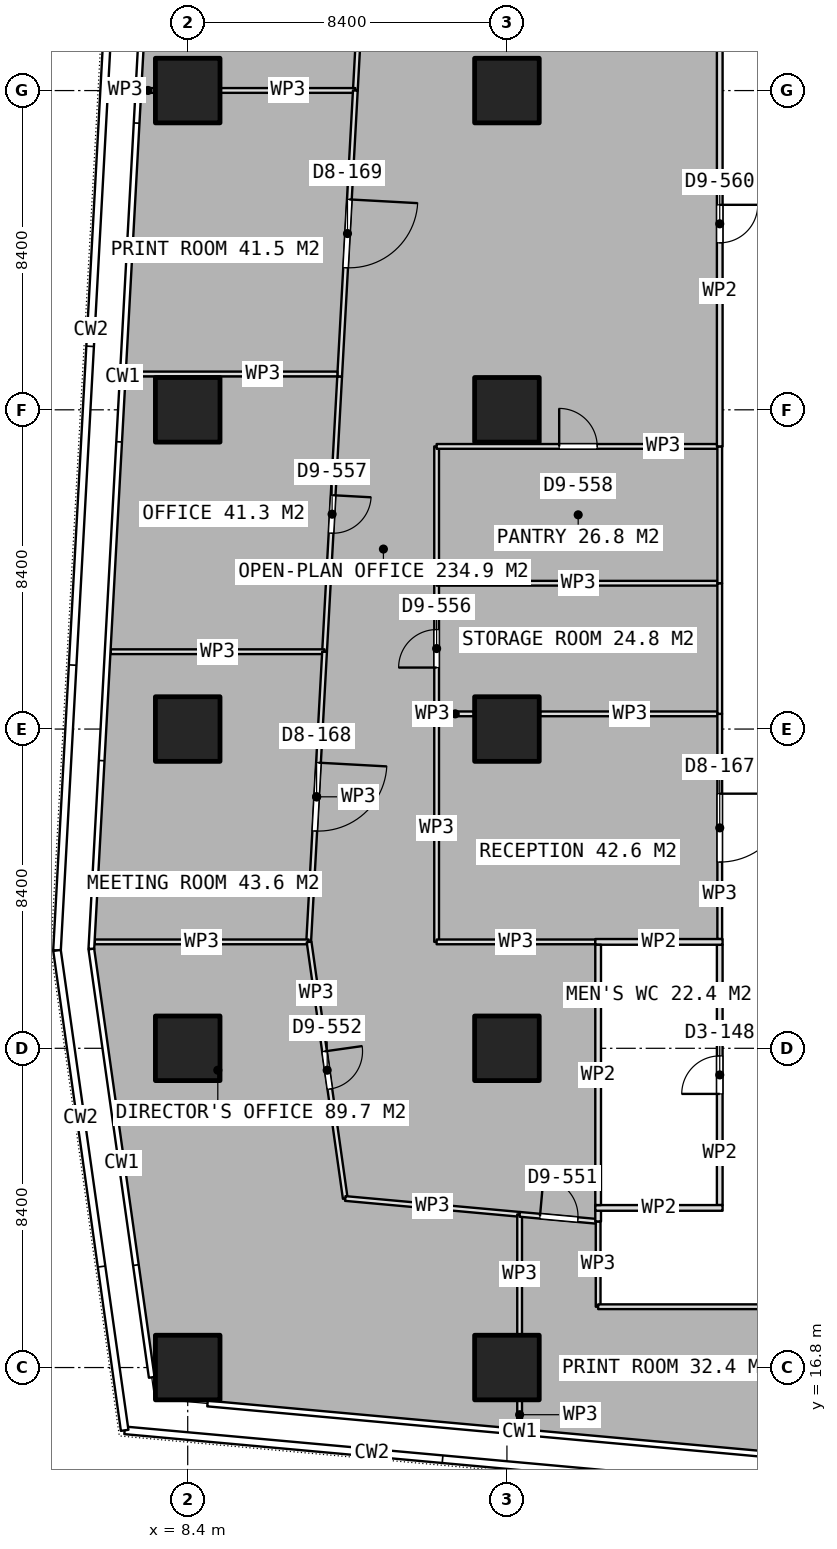
"""IFC4 building model, lengths in metres.
Left out: names, types, materials, properties, quantities, classifications, styles, units other than length and angle.
Written with IfcOpenShell. Run it as: python <this file> out.ifc"""

import sys

from ifc_helpers import new_model, si_unit, direction, frame, frame_2d, origin, origin_2d, place, context, subcontext, project, spatial, rectangle, extrude, element, fill, save


model = new_model("IFC4")
c1 = context("Model", 3, precision=1e-05, world=origin(), true_north=direction((0.0, 1.0)))
c2 = subcontext(c1, "Body", "Model", "MODEL_VIEW")
j1 = project(units=[si_unit("LENGTHUNIT", "METRE"), si_unit("PLANEANGLEUNIT", "RADIAN")], contexts=[c1])
p1 = place(None, origin())
s1 = spatial("IfcSite", under=j1, at=p1, CompositionType="ELEMENT")
p2 = place(p1, origin())
s2 = spatial("IfcBuilding", under=s1, at=p2, CompositionType="ELEMENT")
p3 = place(p2, frame((0.0, 0.0, 140.3)))
s3 = spatial("IfcBuildingStorey", under=s2, at=p3, CompositionType="ELEMENT", Elevation=140.3)
for number, where, z_axis, x_axis in (
    (1, (8.4, 16.8, 0.0), (0.0, 0.0, 1.0), (1.0, 0.0, 0.0)),
    (2, (8.4, 25.2, 0.0), (0.0, 0.0, 1.0), (1.0, 0.0, 0.0)),
    (3, (8.4, 33.6, 0.0), (0.0, 0.0, 1.0), (1.0, 0.0, 0.0)),
    (4, (8.4, 42.0, 0.0), (0.0, 0.0, 1.0), (1.0, 0.0, 0.0)),
    (5, (8.4, 50.4, 0.0), (0.0, 0.0, 1.0), (1.0, 0.0, 0.0)),
    (6, (16.8, 16.8, 0.0), (0.0, 0.0, 1.0), (1.0, 0.0, 0.0)),
    (7, (16.8, 25.2, 0.0), (0.0, 0.0, 1.0), (1.0, 0.0, 0.0)),
    (8, (16.8, 33.6, 0.0), (0.0, 0.0, 1.0), (1.0, 0.0, 0.0)),
    (9, (16.8, 42.0, 0.0), (0.0, 0.0, 1.0), (1.0, 0.0, 0.0)),
    (10, (16.8, 50.4, 0.0), (0.0, 0.0, 1.0), (1.0, 0.0, 0.0)),
):
    element("IfcColumn", number, at=place(p3, frame(where, z_axis=z_axis, x_axis=x_axis)), inside=s3, PredefinedType="COLUMN", context=c2, shape_type="SweptSolid", body=[
        extrude(rectangle(XDim=1.7, YDim=1.7, at=origin_2d()), origin(), (0.0, 0.0, 1.0), 3.75),
    ])
for number, where, z_axis, x_axis in (
    (11, (19.125, 21.0, 0.0), (0.0, 0.0, 1.0), (1.0, 0.0, 0.0)),
    (12, (19.125, 28.0, 0.0), (0.0, 0.0, 1.0), (1.0, 0.0, 0.0)),
):
    element("IfcWall", number, at=place(p3, frame(where, z_axis=z_axis, x_axis=x_axis)), inside=s3, PredefinedType="PARTITIONING", context=c2, shape_type="SweptSolid", body=[
        extrude(rectangle(XDim=3.35, YDim=0.15, at=frame_2d((1.675, 0.0))), origin(), (0.0, 0.0, 1.0), 3.5),
    ])
p4 = place(p3, frame((19.2, 21.075, 0.0), z_axis=(0.0, 0.0, 1.0), x_axis=(0.0, 1.0, 0.0)))
e13 = element("IfcWall", 13, at=p4, inside=s3, PredefinedType="PARTITIONING", context=c2, shape_type="SweptSolid", body=[
    extrude(rectangle(XDim=6.85, YDim=0.15, at=frame_2d((3.425, 0.0))), origin(), (0.0, 0.0, 1.0), 3.5),
])
p5 = place(p3, frame((22.4, 21.075, 0.0), z_axis=(0.0, 0.0, 1.0), x_axis=(0.0, 1.0, 0.0)))
e14 = element("IfcWall", 14, at=p5, inside=s3, PredefinedType="PARTITIONING", context=c2, shape_type="SweptSolid", body=[
    extrude(rectangle(XDim=6.85, YDim=0.15, at=frame_2d((3.425, 0.0))), origin(), (0.0, 0.0, 1.0), 3.5),
])
p6 = place(p5, frame((2.925, 0.0, 0.0)))
e15 = element("IfcOpeningElement", 15, at=p6, cuts=e14, PredefinedType="OPENING", context=c2, shape_type="SweptSolid", body=[
    extrude(rectangle(XDim=1.0, YDim=2.1, at=frame_2d((0.5, 1.05))), frame((0.0, 0.085, 0.0), z_axis=(0.0, -1.0, 0.0), x_axis=(1.0, 0.0, 0.0)), (0.0, 0.0, 1.0), 0.17),
])
p7 = place(p3, frame((13.061, 54.954, 0.0), z_axis=(0.0, 0.0, 1.0), x_axis=(-0.054849980007, -0.998494606742, 0.0)))
e16 = element("IfcWall", 16, at=p7, inside=s3, PredefinedType="PARTITIONING", context=c2, shape_type="SweptSolid", body=[
    extrude(rectangle(XDim=4.558, YDim=0.125, at=frame_2d((2.279, 0.0))), origin(), (0.0, 0.0, 1.0), 3.5),
])
p8 = place(p7, frame((1.779, 0.0, 0.0)))
e17 = element("IfcOpeningElement", 17, at=p8, cuts=e16, PredefinedType="OPENING", context=c2, shape_type="SweptSolid", body=[
    extrude(rectangle(XDim=1.0, YDim=2.1, at=frame_2d((0.5, 1.05))), frame((0.0, 0.073, 0.0), z_axis=(0.0, -1.0, 0.0), x_axis=(1.0, 0.0, 0.0)), (0.0, 0.0, 1.0), 0.145),
])
p9 = place(p3, frame((12.811, 50.403, 0.0), z_axis=(0.0, 0.0, 1.0), x_axis=(-1.0, 0.0, 0.0)))
e18 = element("IfcWall", 18, at=p9, inside=s3, PredefinedType="PARTITIONING", context=c2, shape_type="SweptSolid", body=[
    extrude(rectangle(XDim=3.541, YDim=0.125, at=frame_2d((1.771, 0.0))), origin(), (0.0, 0.0, 1.0), 3.5),
])
p10 = place(p3, frame((7.53, 50.403, 0.0), z_axis=(0.0, 0.0, 1.0), x_axis=(-1.0, 0.0, 0.0)))
e19 = element("IfcWall", 19, at=p10, inside=s3, PredefinedType="PARTITIONING", context=c2, shape_type="SweptSolid", body=[
    extrude(rectangle(XDim=0.347, YDim=0.125, at=frame_2d((0.173, 0.0))), origin(), (0.0, 0.0, 1.0), 3.5),
])
p11 = place(p3, frame((12.811, 50.402, 0.0), z_axis=(0.0, 0.0, 1.0), x_axis=(-0.054783199126, -0.998498272955, 0.0)))
e20 = element("IfcWall", 20, at=p11, inside=s3, PredefinedType="PARTITIONING", context=c2, shape_type="SweptSolid", body=[
    extrude(rectangle(XDim=7.54, YDim=0.125, at=frame_2d((3.77, 0.0))), origin(), (0.0, 0.0, 1.0), 3.5),
])
p12 = place(p11, frame((2.87, 0.0, 0.0)))
e21 = element("IfcOpeningElement", 21, at=p12, cuts=e20, PredefinedType="OPENING", context=c2, shape_type="SweptSolid", body=[
    extrude(rectangle(XDim=1.8, YDim=2.1, at=frame_2d((0.9, 1.05))), frame((0.0, 0.073, 0.0), z_axis=(0.0, -1.0, 0.0), x_axis=(1.0, 0.0, 0.0)), (0.0, 0.0, 1.0), 0.145),
])
p13 = place(p3, frame((12.339, 42.943, 0.0), z_axis=(0.0, 0.0, 1.0), x_axis=(-1.0, 0.0, 0.0)))
e22 = element("IfcWall", 22, at=p13, inside=s3, PredefinedType="PARTITIONING", context=c2, shape_type="SweptSolid", body=[
    extrude(rectangle(XDim=5.595, YDim=0.125, at=frame_2d((2.798, 0.0))), origin(), (0.0, 0.0, 1.0), 3.5),
])
p14 = place(p3, frame((12.398, 42.872, 0.0), z_axis=(0.0, 0.0, 1.0), x_axis=(-0.054770412321, -0.998498974428, 0.0)))
e23 = element("IfcWall", 23, at=p14, inside=s3, PredefinedType="PARTITIONING", context=c2, shape_type="SweptSolid", body=[
    extrude(rectangle(XDim=7.248, YDim=0.125, at=frame_2d((3.624, 0.0))), origin(), (0.0, 0.0, 1.0), 3.5),
])
p15 = place(p14, frame((3.124, 0.0, 0.0)))
e24 = element("IfcOpeningElement", 24, at=p15, cuts=e23, PredefinedType="OPENING", context=c2, shape_type="SweptSolid", body=[
    extrude(rectangle(XDim=1.0, YDim=2.1, at=frame_2d((0.5, 1.05))), frame((0.0, 0.073, 0.0), z_axis=(0.0, -1.0, 0.0), x_axis=(1.0, 0.0, 0.0)), (0.0, 0.0, 1.0), 0.145),
])
p16 = place(p3, frame((12.001, 35.635, 0.0), z_axis=(0.0, 0.0, 1.0), x_axis=(-1.0, 0.0, 0.0)))
e25 = element("IfcWall", 25, at=p16, inside=s3, PredefinedType="PARTITIONING", context=c2, shape_type="SweptSolid", body=[
    extrude(rectangle(XDim=5.628, YDim=0.125, at=frame_2d((2.814, 0.0))), origin(), (0.0, 0.0, 1.0), 3.5),
])
p17 = place(p3, frame((12.001, 35.634, 0.0), z_axis=(0.0, 0.0, 1.0), x_axis=(-0.054668834128, -0.998504541089, 0.0)))
e26 = element("IfcWall", 26, at=p17, inside=s3, PredefinedType="PARTITIONING", context=c2, shape_type="SweptSolid", body=[
    extrude(rectangle(XDim=7.646, YDim=0.125, at=frame_2d((3.823, 0.0))), origin(), (0.0, 0.0, 1.0), 3.5),
])
p18 = place(p17, frame((2.923, 0.0, 0.0)))
e27 = element("IfcOpeningElement", 27, at=p18, cuts=e26, PredefinedType="OPENING", context=c2, shape_type="SweptSolid", body=[
    extrude(rectangle(XDim=1.8, YDim=2.1, at=frame_2d((0.9, 1.05))), frame((0.0, 0.073, 0.0), z_axis=(0.0, -1.0, 0.0), x_axis=(1.0, 0.0, 0.0)), (0.0, 0.0, 1.0), 0.145),
])
p19 = place(p3, frame((11.583, 28.0, 0.0), z_axis=(0.0, 0.0, 1.0), x_axis=(-1.0, 0.0, 0.0)))
e28 = element("IfcWall", 28, at=p19, inside=s3, PredefinedType="PARTITIONING", context=c2, shape_type="SweptSolid", body=[
    extrude(rectangle(XDim=5.629, YDim=0.125, at=frame_2d((2.814, 0.0))), origin(), (0.0, 0.0, 1.0), 3.5),
])
p20 = place(p3, frame((11.594, 27.999, 0.0), z_axis=(0.0, 0.0, 1.0), x_axis=(0.139621335816, -0.990204969986, 0.0)))
e29 = element("IfcWall", 29, at=p20, inside=s3, PredefinedType="PARTITIONING", context=c2, shape_type="SweptSolid", body=[
    extrude(rectangle(XDim=6.818, YDim=0.125, at=frame_2d((3.409, 0.0))), origin(), (0.0, 0.0, 1.0), 3.5),
])
p21 = place(p20, frame((2.909, 0.0, 0.0)))
e30 = element("IfcOpeningElement", 30, at=p21, cuts=e29, PredefinedType="OPENING", context=c2, shape_type="SweptSolid", body=[
    extrude(rectangle(XDim=1.0, YDim=2.1, at=frame_2d((0.5, 1.05))), frame((0.0, 0.073, 0.0), z_axis=(0.0, -1.0, 0.0), x_axis=(1.0, 0.0, 0.0)), (0.0, 0.0, 1.0), 0.145),
])
p22 = place(p3, frame((12.546, 21.248, 0.0), z_axis=(0.0, 0.0, 1.0), x_axis=(0.995895378021, -0.090511855779, 0.0)))
e31 = element("IfcWall", 31, at=p22, inside=s3, PredefinedType="PARTITIONING", context=c2, shape_type="SweptSolid", body=[
    extrude(rectangle(XDim=4.607, YDim=0.125, at=frame_2d((2.303, 0.0))), origin(), (0.0, 0.0, 1.0), 3.5),
])
p23 = place(p3, frame((17.134, 20.831, 0.0), z_axis=(0.0, 0.0, 1.0), x_axis=(0.0, -1.0, 0.0)))
e32 = element("IfcWall", 32, at=p23, inside=s3, PredefinedType="PARTITIONING", context=c2, shape_type="SweptSolid", body=[
    extrude(rectangle(XDim=3.161, YDim=0.125, at=frame_2d((1.581, 0.0))), origin(), (0.0, 0.0, 1.0), 3.5),
])
p24 = place(p3, frame((17.134, 15.93, 0.0), z_axis=(0.0, 0.0, 1.0), x_axis=(0.0, -1.0, 0.0)))
e33 = element("IfcWall", 33, at=p24, inside=s3, PredefinedType="PARTITIONING", context=c2, shape_type="SweptSolid", body=[
    extrude(rectangle(XDim=0.742, YDim=0.125, at=frame_2d((0.371, 0.0))), origin(), (0.0, 0.0, 1.0), 3.5),
])
p25 = place(p3, frame((17.135, 20.831, 0.0), z_axis=(0.0, 0.0, 1.0), x_axis=(0.995924033596, -0.090196004934, 0.0)))
e34 = element("IfcWall", 34, at=p25, inside=s3, PredefinedType="PARTITIONING", context=c2, shape_type="SweptSolid", body=[
    extrude(rectangle(XDim=2.073, YDim=0.125, at=frame_2d((1.037, 0.0))), origin(), (0.0, 0.0, 1.0), 3.5),
])
p26 = place(p25, frame((0.537, 0.0, 0.0)))
e35 = element("IfcOpeningElement", 35, at=p26, cuts=e34, PredefinedType="OPENING", context=c2, shape_type="SweptSolid", body=[
    extrude(rectangle(XDim=1.0, YDim=2.1, at=frame_2d((0.5, 1.05))), frame((0.0, 0.073, 0.0), z_axis=(0.0, -1.0, 0.0), x_axis=(1.0, 0.0, 0.0)), (0.0, 0.0, 1.0), 0.145),
])
p27 = place(p3, frame((19.2, 20.644, 0.0), z_axis=(0.0, 0.0, 1.0), x_axis=(0.0, -1.0, 0.0)))
e36 = element("IfcWall", 36, at=p27, inside=s3, PredefinedType="PARTITIONING", context=c2, shape_type="SweptSolid", body=[
    extrude(rectangle(XDim=2.244, YDim=0.125, at=frame_2d((1.122, 0.0))), origin(), (0.0, 0.0, 1.0), 3.5),
])
p28 = place(p3, frame((19.2, 18.4, 0.0), z_axis=(0.0, 0.0, 1.0), x_axis=(1.0, 0.0, 0.0)))
e37 = element("IfcWall", 37, at=p28, inside=s3, PredefinedType="PARTITIONING", context=c2, shape_type="SweptSolid", body=[
    extrude(rectangle(XDim=6.179, YDim=0.125, at=frame_2d((3.089, 0.0))), origin(), (0.0, 0.0, 1.0), 3.5),
])
p29 = place(p3, frame((14.95, 28.0, 0.0), z_axis=(0.0, 0.0, 1.0), x_axis=(0.0, 1.0, 0.0)))
e38 = element("IfcWall", 38, at=p29, inside=s3, PredefinedType="PARTITIONING", context=c2, shape_type="SweptSolid", body=[
    extrude(rectangle(XDim=6.0, YDim=0.125, at=frame_2d((3.0, 0.0))), origin(), (0.0, 0.0, 1.0), 3.5),
])
p30 = place(p3, frame((14.95, 34.0, 0.0), z_axis=(0.0, 0.0, 1.0), x_axis=(1.0, 0.0, 0.0)))
e39 = element("IfcWall", 39, at=p30, inside=s3, PredefinedType="PARTITIONING", context=c2, shape_type="SweptSolid", body=[
    extrude(rectangle(XDim=0.98, YDim=0.125, at=frame_2d((0.49, 0.0))), origin(), (0.0, 0.0, 1.0), 3.5),
])
p31 = place(p3, frame((17.67, 34.0, 0.0), z_axis=(0.0, 0.0, 1.0), x_axis=(1.0, 0.0, 0.0)))
e40 = element("IfcWall", 40, at=p31, inside=s3, PredefinedType="PARTITIONING", context=c2, shape_type="SweptSolid", body=[
    extrude(rectangle(XDim=4.73, YDim=0.125, at=frame_2d((2.365, 0.0))), origin(), (0.0, 0.0, 1.0), 3.5),
])
p32 = place(p3, frame((22.4, 34.0, 0.0), z_axis=(0.0, 0.0, 1.0), x_axis=(0.0, -1.0, 0.0)))
e41 = element("IfcWall", 41, at=p32, inside=s3, PredefinedType="PARTITIONING", context=c2, shape_type="SweptSolid", body=[
    extrude(rectangle(XDim=5.925, YDim=0.125, at=frame_2d((2.962, 0.0))), origin(), (0.0, 0.0, 1.0), 3.5),
])
p33 = place(p32, frame((2.1, 0.0, 0.0)))
e42 = element("IfcOpeningElement", 42, at=p33, cuts=e41, PredefinedType="OPENING", context=c2, shape_type="SweptSolid", body=[
    extrude(rectangle(XDim=1.8, YDim=2.1, at=frame_2d((0.9, 1.05))), frame((0.0, 0.073, 0.0), z_axis=(0.0, -1.0, 0.0), x_axis=(1.0, 0.0, 0.0)), (0.0, 0.0, 1.0), 0.145),
])
p34 = place(p3, frame((19.125, 28.0, 0.0), z_axis=(0.0, 0.0, 1.0), x_axis=(-1.0, 0.0, 0.0)))
e43 = element("IfcWall", 43, at=p34, inside=s3, PredefinedType="PARTITIONING", context=c2, shape_type="SweptSolid", body=[
    extrude(rectangle(XDim=4.175, YDim=0.125, at=frame_2d((2.087, 0.0))), origin(), (0.0, 0.0, 1.0), 3.5),
])
p35 = place(p3, frame((14.95, 34.0, 0.0), z_axis=(0.0, 0.0, 1.0), x_axis=(0.0, 1.0, 0.0)))
e44 = element("IfcWall", 44, at=p35, inside=s3, PredefinedType="PARTITIONING", context=c2, shape_type="SweptSolid", body=[
    extrude(rectangle(XDim=3.437, YDim=0.125, at=frame_2d((1.719, 0.0))), origin(), (0.0, 0.0, 1.0), 3.5),
])
p36 = place(p35, frame((1.218, 0.0, 0.0)))
e45 = element("IfcOpeningElement", 45, at=p36, cuts=e44, PredefinedType="OPENING", context=c2, shape_type="SweptSolid", body=[
    extrude(rectangle(XDim=1.0, YDim=2.1, at=frame_2d((0.5, 1.05))), frame((0.0, 0.073, 0.0), z_axis=(0.0, -1.0, 0.0), x_axis=(1.0, 0.0, 0.0)), (0.0, 0.0, 1.0), 0.145),
])
p37 = place(p3, frame((14.95, 37.437, 0.0), z_axis=(0.0, 0.0, 1.0), x_axis=(1.0, 0.0, 0.0)))
e46 = element("IfcWall", 46, at=p37, inside=s3, PredefinedType="PARTITIONING", context=c2, shape_type="SweptSolid", body=[
    extrude(rectangle(XDim=7.45, YDim=0.125, at=frame_2d((3.725, 0.0))), origin(), (0.0, 0.0, 1.0), 3.5),
])
p38 = place(p3, frame((22.4, 37.437, 0.0), z_axis=(0.0, 0.0, 1.0), x_axis=(0.0, -1.0, 0.0)))
e47 = element("IfcWall", 47, at=p38, inside=s3, PredefinedType="PARTITIONING", context=c2, shape_type="SweptSolid", body=[
    extrude(rectangle(XDim=3.437, YDim=0.125, at=frame_2d((1.719, 0.0))), origin(), (0.0, 0.0, 1.0), 3.5),
])
p39 = place(p3, frame((14.95, 37.437, 0.0), z_axis=(0.0, 0.0, 1.0), x_axis=(0.0, 1.0, 0.0)))
e48 = element("IfcWall", 48, at=p39, inside=s3, PredefinedType="PARTITIONING", context=c2, shape_type="SweptSolid", body=[
    extrude(rectangle(XDim=3.6, YDim=0.125, at=frame_2d((1.8, 0.0))), origin(), (0.0, 0.0, 1.0), 3.5),
])
p40 = place(p3, frame((14.95, 41.037, 0.0), z_axis=(0.0, 0.0, 1.0), x_axis=(1.0, 0.0, 0.0)))
e49 = element("IfcWall", 49, at=p40, inside=s3, PredefinedType="PARTITIONING", context=c2, shape_type="SweptSolid", body=[
    extrude(rectangle(XDim=7.45, YDim=0.125, at=frame_2d((3.725, 0.0))), origin(), (0.0, 0.0, 1.0), 3.5),
])
p41 = place(p40, frame((3.225, 0.0, 0.0)))
e50 = element("IfcOpeningElement", 50, at=p41, cuts=e49, PredefinedType="OPENING", context=c2, shape_type="SweptSolid", body=[
    extrude(rectangle(XDim=1.0, YDim=2.1, at=frame_2d((0.5, 1.05))), frame((0.0, 0.073, 0.0), z_axis=(0.0, -1.0, 0.0), x_axis=(1.0, 0.0, 0.0)), (0.0, 0.0, 1.0), 0.145),
])
p42 = place(p3, frame((22.4, 41.037, 0.0), z_axis=(0.0, 0.0, 1.0), x_axis=(0.0, -1.0, 0.0)))
e51 = element("IfcWall", 51, at=p42, inside=s3, PredefinedType="PARTITIONING", context=c2, shape_type="SweptSolid", body=[
    extrude(rectangle(XDim=3.6, YDim=0.125, at=frame_2d((1.8, 0.0))), origin(), (0.0, 0.0, 1.0), 3.5),
])
p43 = place(p3, frame((22.4, 52.75, 0.0), z_axis=(0.0, 0.0, 1.0), x_axis=(0.0, -1.0, 0.0)))
e52 = element("IfcWall", 52, at=p43, inside=s3, PredefinedType="PARTITIONING", context=c2, shape_type="SweptSolid", body=[
    extrude(rectangle(XDim=11.713, YDim=0.15, at=frame_2d((5.856, 0.0))), origin(), (0.0, 0.0, 1.0), 3.5),
])
p44 = place(p43, frame((5.356, 0.0, 0.0)))
e53 = element("IfcOpeningElement", 53, at=p44, cuts=e52, PredefinedType="OPENING", context=c2, shape_type="SweptSolid", body=[
    extrude(rectangle(XDim=1.0, YDim=2.1, at=frame_2d((0.5, 1.05))), frame((0.0, 0.085, 0.0), z_axis=(0.0, -1.0, 0.0), x_axis=(1.0, 0.0, 0.0)), (0.0, 0.0, 1.0), 0.17),
])
p45 = place(p3, frame((19.2, 21.075, 0.0), z_axis=(0.0, 0.0, 1.0), x_axis=(0.0, -1.0, 0.0)))
e54 = element("IfcWall", 54, at=p45, inside=s3, PredefinedType="PARTITIONING", context=c2, shape_type="SweptSolid", body=[
    extrude(rectangle(XDim=0.431, YDim=0.15, at=frame_2d((0.215, 0.0))), origin(), (0.0, 0.0, 1.0), 3.5),
])
p46 = place(p6, origin())
e55 = element("IfcDoor", 55, at=p46, inside=s3, OperationType="SINGLE_SWING_LEFT", PredefinedType="DOOR", context=c2, shape_type="SweptSolid", body=[
    extrude(rectangle(XDim=1.0, YDim=2.1, at=frame_2d((0.5, 1.05))), frame((0.0, 0.025, 0.0), z_axis=(0.0, -1.0, 0.0), x_axis=(1.0, 0.0, 0.0)), (0.0, 0.0, 1.0), 0.05),
])
fill(e15, e55)
p47 = place(p12, origin())
e56 = element("IfcDoor", 56, at=p47, inside=s3, OperationType="DOUBLE_DOOR_SINGLE_SWING", PredefinedType="DOOR", context=c2, shape_type="SweptSolid", body=[
    extrude(rectangle(XDim=1.8, YDim=2.1, at=frame_2d((0.9, 1.05))), frame((0.0, 0.025, 0.0), z_axis=(0.0, -1.0, 0.0), x_axis=(1.0, 0.0, 0.0)), (0.0, 0.0, 1.0), 0.05),
])
fill(e21, e56)
p48 = place(p15, origin())
e57 = element("IfcDoor", 57, at=p48, inside=s3, OperationType="SINGLE_SWING_LEFT", PredefinedType="DOOR", context=c2, shape_type="SweptSolid", body=[
    extrude(rectangle(XDim=1.0, YDim=2.1, at=frame_2d((0.5, 1.05))), frame((0.0, 0.025, 0.0), z_axis=(0.0, -1.0, 0.0), x_axis=(1.0, 0.0, 0.0)), (0.0, 0.0, 1.0), 0.05),
])
fill(e24, e57)
p49 = place(p18, origin())
e58 = element("IfcDoor", 58, at=p49, inside=s3, OperationType="DOUBLE_DOOR_SINGLE_SWING", PredefinedType="DOOR", context=c2, shape_type="SweptSolid", body=[
    extrude(rectangle(XDim=1.8, YDim=2.1, at=frame_2d((0.9, 1.05))), frame((0.0, 0.025, 0.0), z_axis=(0.0, -1.0, 0.0), x_axis=(1.0, 0.0, 0.0)), (0.0, 0.0, 1.0), 0.05),
])
fill(e27, e58)
p50 = place(p21, origin())
e59 = element("IfcDoor", 59, at=p50, inside=s3, OperationType="SINGLE_SWING_LEFT", PredefinedType="DOOR", context=c2, shape_type="SweptSolid", body=[
    extrude(rectangle(XDim=1.0, YDim=2.1, at=frame_2d((0.5, 1.05))), frame((0.0, 0.025, 0.0), z_axis=(0.0, -1.0, 0.0), x_axis=(1.0, 0.0, 0.0)), (0.0, 0.0, 1.0), 0.05),
])
fill(e30, e59)
p51 = place(p26, origin())
e60 = element("IfcDoor", 60, at=p51, inside=s3, OperationType="SINGLE_SWING_LEFT", PredefinedType="DOOR", context=c2, shape_type="SweptSolid", body=[
    extrude(rectangle(XDim=1.0, YDim=2.1, at=frame_2d((0.5, 1.05))), frame((0.0, 0.025, 0.0), z_axis=(0.0, -1.0, 0.0), x_axis=(1.0, 0.0, 0.0)), (0.0, 0.0, 1.0), 0.05),
])
fill(e35, e60)
p52 = place(p33, origin())
e61 = element("IfcDoor", 61, at=p52, inside=s3, OperationType="DOUBLE_DOOR_SINGLE_SWING", PredefinedType="DOOR", context=c2, shape_type="SweptSolid", body=[
    extrude(rectangle(XDim=1.8, YDim=2.1, at=frame_2d((0.9, 1.05))), frame((0.0, 0.025, 0.0), z_axis=(0.0, -1.0, 0.0), x_axis=(1.0, 0.0, 0.0)), (0.0, 0.0, 1.0), 0.05),
])
fill(e42, e61)
p53 = place(p36, origin())
e62 = element("IfcDoor", 62, at=p53, inside=s3, OperationType="SINGLE_SWING_LEFT", PredefinedType="DOOR", context=c2, shape_type="SweptSolid", body=[
    extrude(rectangle(XDim=1.0, YDim=2.1, at=frame_2d((0.5, 1.05))), frame((0.0, 0.025, 0.0), z_axis=(0.0, -1.0, 0.0), x_axis=(1.0, 0.0, 0.0)), (0.0, 0.0, 1.0), 0.05),
])
fill(e45, e62)
p54 = place(p41, origin())
e63 = element("IfcDoor", 63, at=p54, inside=s3, OperationType="SINGLE_SWING_LEFT", PredefinedType="DOOR", context=c2, shape_type="SweptSolid", body=[
    extrude(rectangle(XDim=1.0, YDim=2.1, at=frame_2d((0.5, 1.05))), frame((0.0, 0.025, 0.0), z_axis=(0.0, -1.0, 0.0), x_axis=(1.0, 0.0, 0.0)), (0.0, 0.0, 1.0), 0.05),
])
fill(e50, e63)
p55 = place(p44, origin())
e64 = element("IfcDoor", 64, at=p55, inside=s3, OperationType="SINGLE_SWING_LEFT", PredefinedType="DOOR", context=c2, shape_type="SweptSolid", body=[
    extrude(rectangle(XDim=1.0, YDim=2.1, at=frame_2d((0.5, 1.05))), frame((0.0, 0.025, 0.0), z_axis=(0.0, -1.0, 0.0), x_axis=(1.0, 0.0, 0.0)), (0.0, 0.0, 1.0), 0.05),
])
fill(e53, e64)
save(model, sys.argv[1])
